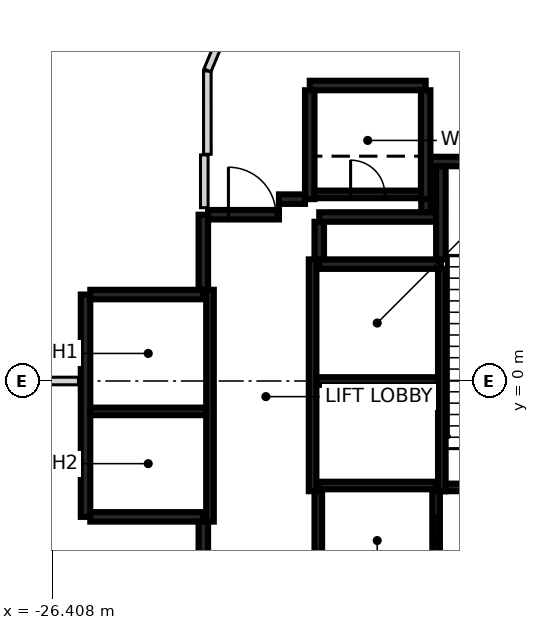
"""IFC4 building model, lengths in metres.
Left out: names, types, materials, properties, quantities, classifications, styles, units other than length and angle.
Written with IfcOpenShell. Run it as: python <this file> out.ifc"""

import sys

from ifc_helpers import new_model, si_unit, direction, frame, frame_2d, origin, place, context, subcontext, project, spatial, rectangle, extrude, element, fill, save


model = new_model("IFC4")
c1 = context("Model", 3, precision=1e-05, world=origin(), true_north=direction((0.0, 1.0)))
c2 = subcontext(c1, "Body", "Model", "MODEL_VIEW")
j1 = project(units=[si_unit("LENGTHUNIT", "METRE"), si_unit("PLANEANGLEUNIT", "RADIAN")], contexts=[c1])
p1 = place(None, origin())
s1 = spatial("IfcSite", under=j1, at=p1, CompositionType="ELEMENT")
p2 = place(p1, origin())
s2 = spatial("IfcBuilding", under=s1, at=p2, CompositionType="ELEMENT")
p3 = place(p2, frame((0.0, 0.0, 19.5)))
s3 = spatial("IfcBuildingStorey", under=s2, at=p3, CompositionType="ELEMENT", Elevation=19.5)
p4 = place(p3, frame((-25.537, -3.575, 0.0), z_axis=(0.0, 0.0, 1.0), x_axis=(0.0, 1.0, 0.0)))
e1 = element("IfcWall", 1, at=p4, inside=s3, PredefinedType="SHEAR", context=c2, shape_type="SweptSolid", body=[
    extrude(rectangle(XDim=5.85, YDim=0.25, at=frame_2d((2.925, 0.0))), origin(), (0.0, 0.0, 1.0), 4.55),
])
p5 = place(p3, frame((-16.472, 5.775, 0.0), z_axis=(0.0, 0.0, 1.0), x_axis=(1.0, 0.0, 0.0)))
e2 = element("IfcWall", 2, at=p5, inside=s3, PredefinedType="SHEAR", context=c2, shape_type="SweptSolid", body=[
    extrude(rectangle(XDim=5.51, YDim=0.25, at=frame_2d((2.755, 0.0))), origin(), (0.0, 0.0, 1.0), 4.55),
])
p6 = place(p3, frame((-19.387, 3.075, 0.0), z_axis=(0.0, 0.0, 1.0), x_axis=(1.0, 0.0, 0.0)))
e3 = element("IfcWall", 3, at=p6, inside=s3, PredefinedType="SHEAR", context=c2, shape_type="SweptSolid", body=[
    extrude(rectangle(XDim=3.2, YDim=0.25, at=frame_2d((1.6, 0.0))), origin(), (0.0, 0.0, 1.0), 4.55),
])
for number, where, z_axis, x_axis in (
    (4, (-22.437, -3.575, 0.0), (0.0, 0.0, 1.0), (-1.0, 0.0, 0.0)),
    (5, (-25.412, 2.275, 0.0), (0.0, 0.0, 1.0), (1.0, 0.0, 0.0)),
):
    element("IfcWall", number, at=place(p3, frame(where, z_axis=z_axis, x_axis=x_axis)), inside=s3, PredefinedType="SHEAR", context=c2, shape_type="SweptSolid", body=[
        extrude(rectangle(XDim=2.975, YDim=0.25, at=frame_2d((1.487, 0.0))), origin(), (0.0, 0.0, 1.0), 4.55),
    ])
p7 = place(p3, frame((-19.637, 7.775, 0.0), z_axis=(0.0, 0.0, 1.0), x_axis=(1.0, 0.0, 0.0)))
e6 = element("IfcWall", 6, at=p7, inside=s3, PredefinedType="SHEAR", context=c2, shape_type="SweptSolid", body=[
    extrude(rectangle(XDim=3.05, YDim=0.25, at=frame_2d((1.525, 0.0))), origin(), (0.0, 0.0, 1.0), 4.55),
])
for number, where, z_axis, x_axis in (
    (7, (-16.587, 7.65, 0.0), (0.0, 0.0, 1.0), (0.0, -1.0, 0.0)),
    (8, (-19.637, 4.785, 0.0), (0.0, 0.0, 1.0), (0.0, 1.0, 0.0)),
):
    element("IfcWall", number, at=place(p3, frame(where, z_axis=z_axis, x_axis=x_axis)), inside=s3, PredefinedType="SHEAR", context=c2, shape_type="SweptSolid", body=[
        extrude(rectangle(XDim=2.865, YDim=0.25, at=frame_2d((1.432, 0.0))), origin(), (0.0, 0.0, 1.0), 4.55),
    ])
p8 = place(p3, frame((-16.302, 4.315, 0.0), z_axis=(0.0, 0.0, 1.0), x_axis=(-1.0, 0.0, 0.0)))
e9 = element("IfcWall", 9, at=p8, inside=s3, PredefinedType="SHEAR", context=c2, shape_type="SweptSolid", body=[
    extrude(rectangle(XDim=3.085, YDim=0.25, at=frame_2d((1.542, 0.0))), origin(), (0.0, 0.0, 1.0), 4.55),
])
p9 = place(p3, frame((-16.187, 3.2, 0.0), z_axis=(0.0, 0.0, 1.0), x_axis=(0.0, 1.0, 0.0)))
e10 = element("IfcWall", 10, at=p9, inside=s3, PredefinedType="SHEAR", context=c2, shape_type="SweptSolid", body=[
    extrude(rectangle(XDim=2.449, YDim=0.25, at=frame_2d((1.225, 0.0))), origin(), (0.0, 0.0, 1.0), 4.55),
])
p10 = place(p3, frame((-22.437, 2.4, 0.0), z_axis=(0.0, 0.0, 1.0), x_axis=(0.0, 1.0, 0.0)))
e11 = element("IfcWall", 11, at=p10, inside=s3, PredefinedType="SHEAR", context=c2, shape_type="SweptSolid", body=[
    extrude(rectangle(XDim=1.975, YDim=0.25, at=frame_2d((0.987, 0.0))), origin(), (0.0, 0.0, 1.0), 4.55),
])
p11 = place(p3, frame((-22.437, -5.55, 0.0), z_axis=(0.0, 0.0, 1.0), x_axis=(0.0, 1.0, 0.0)))
e12 = element("IfcWall", 12, at=p11, inside=s3, PredefinedType="SHEAR", context=c2, shape_type="SweptSolid", body=[
    extrude(rectangle(XDim=1.849, YDim=0.25, at=frame_2d((0.925, 0.0))), origin(), (0.0, 0.0, 1.0), 4.55),
])
p12 = place(p3, frame((-22.312, 4.375, 0.0), z_axis=(0.0, 0.0, 1.0), x_axis=(1.0, 0.0, 0.0)))
e13 = element("IfcWall", 13, at=p12, inside=s3, PredefinedType="SHEAR", context=c2, shape_type="SweptSolid", body=[
    extrude(rectangle(XDim=1.865, YDim=0.25, at=frame_2d((0.932, 0.0))), origin(), (0.0, 0.0, 1.0), 4.55),
])
p13 = place(p12, frame((0.535, 0.0, 0.0)))
e14 = element("IfcOpeningElement", 14, at=p13, cuts=e13, PredefinedType="OPENING", context=c2, shape_type="SweptSolid", body=[
    extrude(rectangle(XDim=1.25, YDim=2.1, at=frame_2d((0.625, 1.05))), frame((0.0, 0.135, 0.0), z_axis=(0.0, -1.0, 0.0), x_axis=(1.0, 0.0, 0.0)), (0.0, 0.0, 1.0), 0.27),
])
p14 = place(p3, frame((-19.387, 4.19, 0.0), z_axis=(0.0, 0.0, 1.0), x_axis=(0.0, -1.0, 0.0)))
e15 = element("IfcWall", 15, at=p14, inside=s3, PredefinedType="SHEAR", context=c2, shape_type="SweptSolid", body=[
    extrude(rectangle(XDim=0.989, YDim=0.25, at=frame_2d((0.495, 0.0))), origin(), (0.0, 0.0, 1.0), 4.55),
])
p15 = place(p3, frame((-20.447, 4.785, 0.0), z_axis=(0.0, 0.0, 1.0), x_axis=(1.0, 0.0, 0.0)))
e16 = element("IfcWall", 16, at=p15, inside=s3, PredefinedType="SHEAR", context=c2, shape_type="SweptSolid", body=[
    extrude(rectangle(XDim=0.685, YDim=0.25, at=frame_2d((0.342, 0.0))), origin(), (0.0, 0.0, 1.0), 4.55),
])
p16 = place(p3, frame((-16.577, 4.785, 0.0), z_axis=(0.0, 0.0, 1.0), x_axis=(0.0, -1.0, 0.0)))
e17 = element("IfcWall", 17, at=p16, inside=s3, PredefinedType="SHEAR", context=c2, shape_type="SweptSolid", body=[
    extrude(rectangle(XDim=0.344, YDim=0.25, at=frame_2d((0.172, 0.0))), origin(), (0.0, 0.0, 1.0), 4.55),
])
p17 = place(p3, frame((-16.162, 2.951, 0.0), z_axis=(0.0, 0.0, 1.0), x_axis=(0.0, -1.0, 0.0)))
e18 = element("IfcWall", 18, at=p17, inside=s3, PredefinedType="SHEAR", context=c2, shape_type="SweptSolid", body=[
    extrude(rectangle(XDim=5.851, YDim=0.2, at=frame_2d((2.925, 0.0))), origin(), (0.0, 0.0, 1.0), 4.55),
])
for number, where, z_axis, x_axis in (
    (19, (-19.562, -2.9, 0.0), (0.0, 0.0, 1.0), (0.0, 1.0, 0.0)),
    (20, (-22.262, 2.4, 0.0), (0.0, 0.0, 1.0), (0.0, -1.0, 0.0)),
):
    element("IfcWall", number, at=place(p3, frame(where, z_axis=z_axis, x_axis=x_axis)), inside=s3, PredefinedType="SHEAR", context=c2, shape_type="SweptSolid", body=[
        extrude(rectangle(XDim=6.1, YDim=0.2, at=frame_2d((3.05, 0.0))), origin(), (0.0, 0.0, 1.0), 4.55),
    ])
p18 = place(p3, frame((-10.963, -2.8, 0.0), z_axis=(0.0, 0.0, 1.0), x_axis=(-1.0, 0.0, 0.0)))
e21 = element("IfcWall", 21, at=p18, inside=s3, PredefinedType="SHEAR", context=c2, shape_type="SweptSolid", body=[
    extrude(rectangle(XDim=5.098, YDim=0.2, at=frame_2d((2.549, 0.0))), origin(), (0.0, 0.0, 1.0), 4.55),
])
p19 = place(p18, frame((1.774, 0.0, 0.0)))
e22 = element("IfcOpeningElement", 22, at=p19, cuts=e21, PredefinedType="OPENING", context=c2, shape_type="SweptSolid", body=[
    extrude(rectangle(XDim=1.4, YDim=2.1, at=frame_2d((0.7, 1.05))), frame((0.0, 0.11, 0.0), z_axis=(0.0, -1.0, 0.0), x_axis=(1.0, 0.0, 0.0)), (0.0, 0.0, 1.0), 0.22),
])
p20 = place(p3, frame((-16.263, 0.0, 0.0), z_axis=(0.0, 0.0, 1.0), x_axis=(-1.0, 0.0, 0.0)))
e23 = element("IfcWall", 23, at=p20, inside=s3, PredefinedType="SHEAR", context=c2, shape_type="SweptSolid", body=[
    extrude(rectangle(XDim=3.198, YDim=0.2, at=frame_2d((1.599, 0.0))), origin(), (0.0, 0.0, 1.0), 4.55),
])
p21 = place(p3, frame((-22.363, -0.8, 0.0), z_axis=(0.0, 0.0, 1.0), x_axis=(-1.0, 0.0, 0.0)))
e24 = element("IfcWall", 24, at=p21, inside=s3, PredefinedType="SHEAR", context=c2, shape_type="SweptSolid", body=[
    extrude(rectangle(XDim=3.048, YDim=0.2, at=frame_2d((1.524, 0.0))), origin(), (0.0, 0.0, 1.0), 4.55),
])
p22 = place(p3, frame((-19.511, 4.91, 0.0), z_axis=(0.0, 0.0, 1.0), x_axis=(1.0, 0.0, 0.0)))
e25 = element("IfcWall", 25, at=p22, inside=s3, PredefinedType="SHEAR", context=c2, shape_type="SweptSolid", body=[
    extrude(rectangle(XDim=2.798, YDim=0.2, at=frame_2d((1.399, 0.0))), origin(), (0.0, 0.0, 1.0), 4.55),
])
p23 = place(p22, frame((0.949, 0.0, 0.0)))
e26 = element("IfcOpeningElement", 26, at=p23, cuts=e25, PredefinedType="OPENING", context=c2, shape_type="SweptSolid", body=[
    extrude(rectangle(XDim=0.9, YDim=2.1, at=frame_2d((0.45, 1.05))), frame((0.0, 0.11, 0.0), z_axis=(0.0, -1.0, 0.0), x_axis=(1.0, 0.0, 0.0)), (0.0, 0.0, 1.0), 0.22),
])
p24 = place(p3, frame((-19.412, -2.75, 0.0), z_axis=(0.0, 0.0, 1.0), x_axis=(1.0, 0.0, 0.0)))
e27 = element("IfcWall", 27, at=p24, inside=s3, PredefinedType="SHEAR", context=c2, shape_type="SweptSolid", body=[
    extrude(rectangle(XDim=3.1, YDim=0.2, at=frame_2d((1.55, 0.0))), origin(), (0.0, 0.0, 1.0), 4.55),
])
p25 = place(p3, frame((-16.312, -2.898, 0.0), z_axis=(0.0, 0.0, 1.0), x_axis=(0.0, -1.0, 0.0)))
e28 = element("IfcWall", 28, at=p25, inside=s3, PredefinedType="SHEAR", context=c2, shape_type="SweptSolid", body=[
    extrude(rectangle(XDim=2.651, YDim=0.2, at=frame_2d((1.325, 0.0))), origin(), (0.0, 0.0, 1.0), 4.55),
])
p26 = place(p25, frame((0.652, 0.0, 0.0)))
e29 = element("IfcOpeningElement", 29, at=p26, cuts=e28, PredefinedType="OPENING", context=c2, shape_type="SweptSolid", body=[
    extrude(rectangle(XDim=1.3, YDim=2.1, at=frame_2d((0.65, 1.05))), frame((0.0, 0.11, 0.0), z_axis=(0.0, -1.0, 0.0), x_axis=(1.0, 0.0, 0.0)), (0.0, 0.0, 1.0), 0.22),
])
p27 = place(p3, frame((-19.412, -5.549, 0.0), z_axis=(0.0, 0.0, 1.0), x_axis=(0.0, 1.0, 0.0)))
e30 = element("IfcWall", 30, at=p27, inside=s3, PredefinedType="SHEAR", context=c2, shape_type="SweptSolid", body=[
    extrude(rectangle(XDim=2.651, YDim=0.2, at=frame_2d((1.325, 0.0))), origin(), (0.0, 0.0, 1.0), 4.55),
])
p28 = place(p3, frame((-22.412, 4.56, 0.0), z_axis=(0.0, 0.0, 1.0), x_axis=(0.0, 1.0, 0.0)))
e31 = element("IfcWall", 31, at=p28, inside=s3, PredefinedType="PARTITIONING", context=c2, shape_type="SweptSolid", body=[
    extrude(rectangle(XDim=1.389, YDim=0.2, at=frame_2d((0.694, 0.0))), origin(), (0.0, 0.0, 1.0), 4.55),
])
p29 = place(p3, frame((-22.332, 8.156, 0.0), z_axis=(0.0, 0.0, 1.0), x_axis=(0.000445732071, -0.999999900661, 0.0)))
e32 = element("IfcWall", 32, at=p29, inside=s3, PredefinedType="PARTITIONING", context=c2, shape_type="SweptSolid", body=[
    extrude(rectangle(XDim=2.191, YDim=0.2, at=frame_2d((1.095, 0.0))), origin(), (0.0, 0.0, 1.0), 4.55),
])
p30 = place(p3, frame((-22.329, 8.173, 0.0), z_axis=(0.0, 0.0, 1.0), x_axis=(0.384787661824, 0.923005122038, 0.0)))
e33 = element("IfcWall", 33, at=p30, inside=s3, PredefinedType="PARTITIONING", context=c2, shape_type="SweptSolid", body=[
    extrude(rectangle(XDim=1.71, YDim=0.2, at=frame_2d((0.855, 0.0))), origin(), (0.0, 0.0, 1.0), 4.55),
])
p31 = place(p3, frame((-15.986, 10.444, 0.0), z_axis=(0.0, 0.0, 1.0), x_axis=(0.943084193671, -0.332554061241, 0.0)))
e34 = element("IfcWall", 34, at=p31, inside=s3, PredefinedType="PARTITIONING", context=c2, shape_type="SweptSolid", body=[
    extrude(rectangle(XDim=6.24, YDim=0.2, at=frame_2d((3.12, 0.0))), origin(), (0.0, 0.0, 1.0), 4.55),
])
p32 = place(p31, frame((2.62, 0.0, 0.0)))
e35 = element("IfcOpeningElement", 35, at=p32, cuts=e34, PredefinedType="OPENING", context=c2, shape_type="SweptSolid", body=[
    extrude(rectangle(XDim=1.0, YDim=2.1, at=frame_2d((0.5, 1.05))), frame((0.0, 0.11, 0.0), z_axis=(0.0, -1.0, 0.0), x_axis=(1.0, 0.0, 0.0)), (0.0, 0.0, 1.0), 0.22),
])
p33 = place(p3, frame((-45.098, 0.0, 0.0), z_axis=(0.0, 0.0, 1.0), x_axis=(1.0, 0.0, 0.0)))
e36 = element("IfcWall", 36, at=p33, inside=s3, PredefinedType="PARTITIONING", context=c2, shape_type="SweptSolid", body=[
    extrude(rectangle(XDim=19.376, YDim=0.2, at=frame_2d((9.688, 0.0))), origin(), (0.0, 0.0, 1.0), 4.55),
])
p34 = place(p26, origin())
e37 = element("IfcDoor", 37, at=p34, inside=s3, OperationType="SLIDING_TO_RIGHT", PredefinedType="DOOR", context=c2, shape_type="SweptSolid", body=[
    extrude(rectangle(XDim=1.3, YDim=2.1, at=frame_2d((0.65, 1.05))), frame((0.0, 0.025, 0.0), z_axis=(0.0, -1.0, 0.0), x_axis=(1.0, 0.0, 0.0)), (0.0, 0.0, 1.0), 0.05),
])
fill(e29, e37)
p35 = place(p13, origin())
e38 = element("IfcDoor", 38, at=p35, inside=s3, OperationType="SINGLE_SWING_LEFT", PredefinedType="DOOR", context=c2, shape_type="SweptSolid", body=[
    extrude(rectangle(XDim=1.25, YDim=2.1, at=frame_2d((0.625, 1.05))), frame((0.0, 0.025, 0.0), z_axis=(0.0, -1.0, 0.0), x_axis=(1.0, 0.0, 0.0)), (0.0, 0.0, 1.0), 0.05),
])
fill(e14, e38)
p36 = place(p23, origin())
e39 = element("IfcDoor", 39, at=p36, inside=s3, OperationType="SINGLE_SWING_LEFT", PredefinedType="DOOR", context=c2, shape_type="SweptSolid", body=[
    extrude(rectangle(XDim=0.9, YDim=2.1, at=frame_2d((0.45, 1.05))), frame((0.0, 0.025, 0.0), z_axis=(0.0, -1.0, 0.0), x_axis=(1.0, 0.0, 0.0)), (0.0, 0.0, 1.0), 0.05),
])
fill(e26, e39)
save(model, sys.argv[1])
